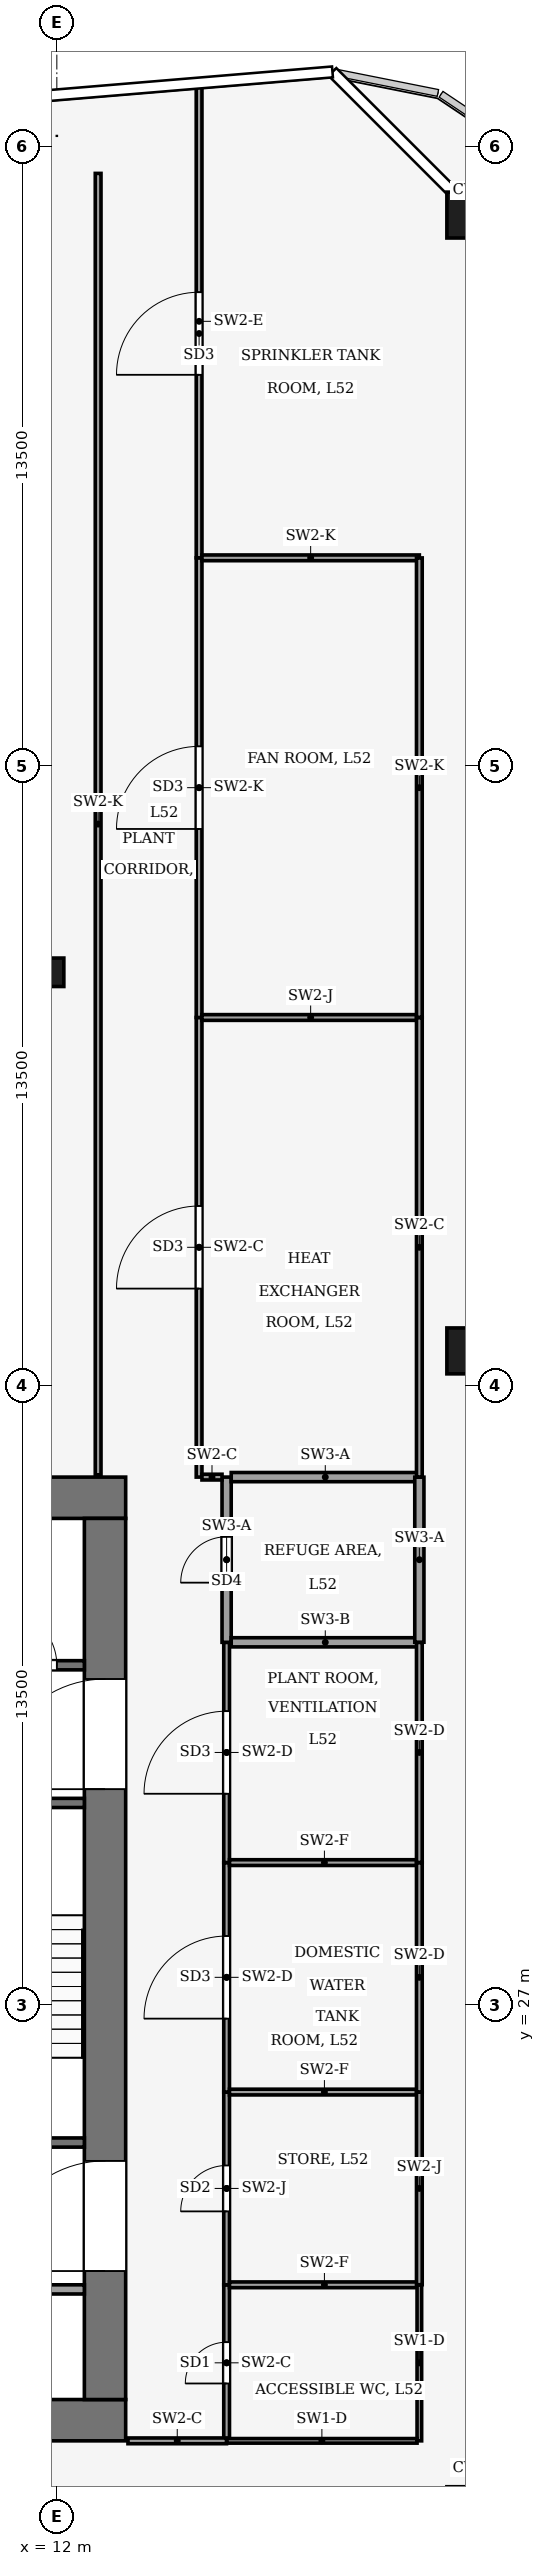
"""IFC4 building model, lengths in metres.
Left out: names, types, materials, properties, quantities, classifications, styles, units other than length and angle.
Written with IfcOpenShell. Run it as: python <this file> out.ifc"""

import sys

from ifc_helpers import new_model, si_unit, direction, frame, frame_2d, origin, origin_2d, place, context, subcontext, project, spatial, rectangle, hollow_rectangle, i_section, extrude, element, fill, save


model = new_model("IFC4")
c1 = context("Model", 3, precision=1e-05, world=origin(), true_north=direction((0.0, 1.0)))
c2 = subcontext(c1, "Body", "Model", "MODEL_VIEW")
j1 = project(units=[si_unit("LENGTHUNIT", "METRE"), si_unit("PLANEANGLEUNIT", "RADIAN")], contexts=[c1])
p1 = place(None, origin())
s1 = spatial("IfcSite", under=j1, at=p1, CompositionType="ELEMENT")
p2 = place(p1, origin())
s2 = spatial("IfcBuilding", under=s1, at=p2, CompositionType="ELEMENT")
p3 = place(p2, frame((0.0, 0.0, 226.0)))
s3 = spatial("IfcBuildingStorey", under=s2, at=p3, CompositionType="ELEMENT", Elevation=226.0)
for number, where, z_axis, x_axis in (
    (1, (-13.5, 17.95, -0.25), (0.0, 0.0, 1.0), (1.0, 0.0, 0.0)),
    (2, (-13.5, 38.05, -0.25), (0.0, 0.0, 1.0), (1.0, 0.0, 0.0)),
):
    element("IfcWall", number, at=place(p3, frame(where, z_axis=z_axis, x_axis=x_axis)), inside=s3, PredefinedType="SHEAR", context=c2, shape_type="SweptSolid", body=[
        extrude(rectangle(XDim=27.0, YDim=0.9, at=frame_2d((13.5, 0.0))), origin(), (0.0, 0.0, 1.0), 7.12),
    ])
p4 = place(p3, frame((13.05, 18.4, -0.25), z_axis=(0.0, 0.0, 1.0), x_axis=(0.0, 1.0, 0.0)))
e3 = element("IfcWall", 3, at=p4, inside=s3, PredefinedType="SHEAR", context=c2, shape_type="SweptSolid", body=[
    extrude(rectangle(XDim=19.2, YDim=0.9, at=frame_2d((9.6, 0.0))), origin(), (0.0, 0.0, 1.0), 7.12),
])
p5 = place(p4, frame((2.8, 0.0, 0.25)))
e4 = element("IfcOpeningElement", 4, at=p5, cuts=e3, PredefinedType="OPENING", context=c2, shape_type="SweptSolid", body=[
    extrude(rectangle(XDim=2.4, YDim=2.4, at=frame_2d((1.2, 1.2))), frame((0.0, 0.46, 0.0), z_axis=(0.0, -1.0, 0.0), x_axis=(1.0, 0.0, 0.0)), (0.0, 0.0, 1.0), 0.92),
])
p6 = place(p4, frame((13.3, 0.0, 0.25)))
e5 = element("IfcOpeningElement", 5, at=p6, cuts=e3, PredefinedType="OPENING", context=c2, shape_type="SweptSolid", body=[
    extrude(rectangle(XDim=2.4, YDim=2.4, at=frame_2d((1.2, 1.2))), frame((0.0, 0.46, 0.0), z_axis=(0.0, -1.0, 0.0), x_axis=(1.0, 0.0, 0.0)), (0.0, 0.0, 1.0), 0.92),
])
for number, where, z_axis, x_axis in (
    (6, (21.0, 66.0, 0.0), (0.0, 0.0, 1.0), (1.0, 0.0, 0.0)),
    (7, (21.0, 41.25, 0.0), (0.0, 0.0, 1.0), (1.0, 0.0, 0.0)),
):
    element("IfcColumn", number, at=place(p3, frame(where, z_axis=z_axis, x_axis=x_axis)), inside=s3, PredefinedType="COLUMN", context=c2, shape_type="SweptSolid", body=[
        extrude(hollow_rectangle(XDim=1.0, YDim=1.0, WallThickness=0.06, at=origin_2d()), origin(), (0.0, 0.0, 1.0), 7.0),
    ])
p7 = place(p3, frame((12.0, 67.7, 0.023), z_axis=(0.0, 0.007196331241, 0.999974106073), x_axis=(-1.0, 0.0, 0.0)))
e8 = element("IfcColumn", 8, at=p7, inside=s3, PredefinedType="COLUMN", context=c2, shape_type="SweptSolid", body=[
    extrude(hollow_rectangle(XDim=0.7, YDim=0.7, WallThickness=0.03, at=origin_2d()), origin(), (0.0, 0.0, 1.0), 6.955),
])
p8 = place(p3, frame((12.0, 49.5, 0.0), z_axis=(0.0, 0.0, 1.0), x_axis=(1.0, 0.0, 0.0)))
e9 = element("IfcColumn", 9, at=p8, inside=s3, PredefinedType="COLUMN", context=c2, shape_type="SweptSolid", body=[
    extrude(i_section(OverallWidth=0.305, OverallDepth=0.62, WebThickness=0.021, FlangeThickness=0.04, FilletRadius=0.027, at=origin_2d()), origin(), (0.0, 0.0, 1.0), 7.0),
])
p9 = place(p3, frame((6.0, 20.8, 0.0), z_axis=(0.0, 0.0, 1.0), x_axis=(1.0, 0.0, 0.0)))
e10 = element("IfcWall", 10, at=p9, inside=s3, PredefinedType="PARTITIONING", context=c2, shape_type="SweptSolid", body=[
    extrude(rectangle(XDim=6.6, YDim=0.2, at=frame_2d((3.3, 0.0))), origin(), (0.0, 0.0, 1.0), 6.87),
])
p10 = place(p9, frame((2.8, 0.0, 0.0)))
e11 = element("IfcOpeningElement", 11, at=p10, cuts=e10, PredefinedType="OPENING", context=c2, shape_type="SweptSolid", body=[
    extrude(rectangle(XDim=1.0, YDim=2.1, at=frame_2d((0.5, 1.05))), frame((0.0, 0.11, 0.0), z_axis=(0.0, -1.0, 0.0), x_axis=(1.0, 0.0, 0.0)), (0.0, 0.0, 1.0), 0.22),
])
p11 = place(p3, frame((6.0, 24.0, 0.0), z_axis=(0.0, 0.0, 1.0), x_axis=(1.0, 0.0, 0.0)))
e12 = element("IfcWall", 12, at=p11, inside=s3, PredefinedType="PARTITIONING", context=c2, shape_type="SweptSolid", body=[
    extrude(rectangle(XDim=6.6, YDim=0.2, at=frame_2d((3.3, 0.0))), origin(), (0.0, 0.0, 1.0), 6.87),
])
p12 = place(p11, frame((0.9, 0.0, 0.0)))
e13 = element("IfcOpeningElement", 13, at=p12, cuts=e12, PredefinedType="OPENING", context=c2, shape_type="SweptSolid", body=[
    extrude(rectangle(XDim=1.0, YDim=2.1, at=frame_2d((0.5, 1.05))), frame((0.0, 0.11, 0.0), z_axis=(0.0, -1.0, 0.0), x_axis=(1.0, 0.0, 0.0)), (0.0, 0.0, 1.0), 0.22),
])
p13 = place(p11, frame((4.4, 0.0, 0.0)))
e14 = element("IfcOpeningElement", 14, at=p13, cuts=e12, PredefinedType="OPENING", context=c2, shape_type="SweptSolid", body=[
    extrude(rectangle(XDim=1.2, YDim=2.2, at=frame_2d((0.6, 1.1))), frame((0.0, 0.11, 0.0), z_axis=(0.0, -1.0, 0.0), x_axis=(1.0, 0.0, 0.0)), (0.0, 0.0, 1.0), 0.22),
])
p14 = place(p3, frame((6.0, 31.4, 0.0), z_axis=(0.0, 0.0, 1.0), x_axis=(1.0, 0.0, 0.0)))
e15 = element("IfcWall", 15, at=p14, inside=s3, PredefinedType="PARTITIONING", context=c2, shape_type="SweptSolid", body=[
    extrude(rectangle(XDim=6.6, YDim=0.2, at=frame_2d((3.3, 0.0))), origin(), (0.0, 0.0, 1.0), 6.87),
])
p15 = place(p3, frame((6.0, 34.4, 0.0), z_axis=(0.0, 0.0, 1.0), x_axis=(1.0, 0.0, 0.0)))
e16 = element("IfcWall", 16, at=p15, inside=s3, PredefinedType="PARTITIONING", context=c2, shape_type="SweptSolid", body=[
    extrude(rectangle(XDim=6.6, YDim=0.2, at=frame_2d((3.3, 0.0))), origin(), (0.0, 0.0, 1.0), 6.87),
])
p16 = place(p15, frame((4.8, 0.0, 0.0)))
e17 = element("IfcOpeningElement", 17, at=p16, cuts=e16, PredefinedType="OPENING", context=c2, shape_type="SweptSolid", body=[
    extrude(rectangle(XDim=1.2, YDim=2.2, at=frame_2d((0.6, 1.1))), frame((0.0, 0.11, 0.0), z_axis=(0.0, -1.0, 0.0), x_axis=(1.0, 0.0, 0.0)), (0.0, 0.0, 1.0), 0.22),
])
p17 = place(p3, frame((15.7, 17.5, 0.0), z_axis=(0.0, 0.0, 1.0), x_axis=(0.0, 1.0, 0.0)))
e18 = element("IfcWall", 18, at=p17, inside=s3, PredefinedType="PARTITIONING", context=c2, shape_type="SweptSolid", body=[
    extrude(rectangle(XDim=3.4, YDim=0.125, at=frame_2d((1.7, 0.0))), origin(), (0.0, 0.0, 1.0), 6.14),
])
p18 = place(p17, frame((1.25, 0.0, 0.0)))
e19 = element("IfcOpeningElement", 19, at=p18, cuts=e18, PredefinedType="OPENING", context=c2, shape_type="SweptSolid", body=[
    extrude(rectangle(XDim=0.9, YDim=2.1, at=frame_2d((0.45, 1.05))), frame((0.0, 0.073, 0.0), z_axis=(0.0, -1.0, 0.0), x_axis=(1.0, 0.0, 0.0)), (0.0, 0.0, 1.0), 0.145),
])
p19 = place(p3, frame((15.7, 20.9, 0.0), z_axis=(0.0, 0.0, 1.0), x_axis=(0.0, 1.0, 0.0)))
e20 = element("IfcWall", 20, at=p19, inside=s3, PredefinedType="PARTITIONING", context=c2, shape_type="SweptSolid", body=[
    extrude(rectangle(XDim=4.2, YDim=0.125, at=frame_2d((2.1, 0.0))), origin(), (0.0, 0.0, 1.0), 6.39),
])
p20 = place(p19, frame((1.6, 0.0, 0.0)))
e21 = element("IfcOpeningElement", 21, at=p20, cuts=e20, PredefinedType="OPENING", context=c2, shape_type="SweptSolid", body=[
    extrude(rectangle(XDim=1.0, YDim=2.1, at=frame_2d((0.5, 1.05))), frame((0.0, 0.073, 0.0), z_axis=(0.0, -1.0, 0.0), x_axis=(1.0, 0.0, 0.0)), (0.0, 0.0, 1.0), 0.145),
])
p21 = place(p3, frame((15.7, 25.1, 0.0), z_axis=(0.0, 0.0, 1.0), x_axis=(0.0, 1.0, 0.0)))
e22 = element("IfcWall", 22, at=p21, inside=s3, PredefinedType="PARTITIONING", context=c2, shape_type="SweptSolid", body=[
    extrude(rectangle(XDim=5.0, YDim=0.125, at=frame_2d((2.5, 0.0))), origin(), (0.0, 0.0, 1.0), 6.44),
])
p22 = place(p21, frame((1.6, 0.0, 0.0)))
e23 = element("IfcOpeningElement", 23, at=p22, cuts=e22, PredefinedType="OPENING", context=c2, shape_type="SweptSolid", body=[
    extrude(rectangle(XDim=1.8, YDim=2.4, at=frame_2d((0.9, 1.2))), frame((0.0, 0.073, 0.0), z_axis=(0.0, -1.0, 0.0), x_axis=(1.0, 0.0, 0.0)), (0.0, 0.0, 1.0), 0.145),
])
p23 = place(p3, frame((15.7, 30.1, 0.0), z_axis=(0.0, 0.0, 1.0), x_axis=(0.0, 1.0, 0.0)))
e24 = element("IfcWall", 24, at=p23, inside=s3, PredefinedType="PARTITIONING", context=c2, shape_type="SweptSolid", body=[
    extrude(rectangle(XDim=4.8, YDim=0.125, at=frame_2d((2.4, 0.0))), origin(), (0.0, 0.0, 1.0), 6.44),
])
p24 = place(p23, frame((1.5, 0.0, 0.0)))
e25 = element("IfcOpeningElement", 25, at=p24, cuts=e24, PredefinedType="OPENING", context=c2, shape_type="SweptSolid", body=[
    extrude(rectangle(XDim=1.8, YDim=2.4, at=frame_2d((0.9, 1.2))), frame((0.0, 0.073, 0.0), z_axis=(0.0, -1.0, 0.0), x_axis=(1.0, 0.0, 0.0)), (0.0, 0.0, 1.0), 0.145),
])
p25 = place(p3, frame((15.7, 34.9, 0.0), z_axis=(0.0, 0.0, 1.0), x_axis=(0.0, 1.0, 0.0)))
e26 = element("IfcWall", 26, at=p25, inside=s3, PredefinedType="PARTITIONING", context=c2, shape_type="SweptSolid", body=[
    extrude(rectangle(XDim=3.6, YDim=0.2, at=frame_2d((1.8, 0.0))), origin(), (0.0, 0.0, 1.0), 6.14),
])
p26 = place(p25, frame((1.3, 0.0, 0.0)))
e27 = element("IfcOpeningElement", 27, at=p26, cuts=e26, PredefinedType="OPENING", context=c2, shape_type="SweptSolid", body=[
    extrude(rectangle(XDim=1.0, YDim=2.1, at=frame_2d((0.5, 1.05))), frame((0.0, 0.11, 0.0), z_axis=(0.0, -1.0, 0.0), x_axis=(1.0, 0.0, 0.0)), (0.0, 0.0, 1.0), 0.22),
])
p27 = place(p3, frame((15.1, 38.5, 0.0), z_axis=(0.0, 0.0, 1.0), x_axis=(0.0, 1.0, 0.0)))
e28 = element("IfcWall", 28, at=p27, inside=s3, PredefinedType="PARTITIONING", context=c2, shape_type="SweptSolid", body=[
    extrude(rectangle(XDim=10.015, YDim=0.125, at=frame_2d((5.007, 0.0))), origin(), (0.0, 0.0, 1.0), 6.14),
])
p28 = place(p27, frame((4.107, 0.0, 0.0)))
e29 = element("IfcOpeningElement", 29, at=p28, cuts=e28, PredefinedType="OPENING", context=c2, shape_type="SweptSolid", body=[
    extrude(rectangle(XDim=1.8, YDim=2.4, at=frame_2d((0.9, 1.2))), frame((0.0, 0.073, 0.0), z_axis=(0.0, -1.0, 0.0), x_axis=(1.0, 0.0, 0.0)), (0.0, 0.0, 1.0), 0.145),
])
p29 = place(p3, frame((15.163, 38.5, 0.0), z_axis=(0.0, 0.0, 1.0), x_axis=(1.0, 0.0, 0.0)))
e30 = element("IfcWall", 30, at=p29, inside=s3, PredefinedType="PARTITIONING", context=c2, shape_type="SweptSolid", body=[
    extrude(rectangle(XDim=0.438, YDim=0.125, at=frame_2d((0.219, 0.0))), origin(), (0.0, 0.0, 1.0), 6.14),
])
p30 = place(p3, frame((15.1, 48.515, 0.0), z_axis=(0.0, 0.0, 1.0), x_axis=(0.0, 1.0, 0.0)))
e31 = element("IfcWall", 31, at=p30, inside=s3, PredefinedType="PARTITIONING", context=c2, shape_type="SweptSolid", body=[
    extrude(rectangle(XDim=10.016, YDim=0.125, at=frame_2d((5.008, 0.0))), origin(), (0.0, 0.0, 1.0), 6.24),
])
p31 = place(p30, frame((4.108, 0.0, 0.0)))
e32 = element("IfcOpeningElement", 32, at=p31, cuts=e31, PredefinedType="OPENING", context=c2, shape_type="SweptSolid", body=[
    extrude(rectangle(XDim=1.8, YDim=2.4, at=frame_2d((0.9, 1.2))), frame((0.0, 0.073, 0.0), z_axis=(0.0, -1.0, 0.0), x_axis=(1.0, 0.0, 0.0)), (0.0, 0.0, 1.0), 0.145),
])
p32 = place(p3, frame((15.1, 58.531, 0.0), z_axis=(0.0, 0.0, 1.0), x_axis=(0.0, 1.0, 0.0)))
e33 = element("IfcWall", 33, at=p32, inside=s3, PredefinedType="PARTITIONING", context=c2, shape_type="SweptSolid", body=[
    extrude(rectangle(XDim=10.307, YDim=0.125, at=frame_2d((5.154, 0.0))), origin(), (0.0, 0.0, 1.0), 6.04),
])
p33 = place(p32, frame((3.988, 0.0, 0.0)))
e34 = element("IfcOpeningElement", 34, at=p33, cuts=e33, PredefinedType="OPENING", context=c2, shape_type="SweptSolid", body=[
    extrude(rectangle(XDim=1.8, YDim=2.4, at=frame_2d((0.9, 1.2))), frame((0.0, 0.073, 0.0), z_axis=(0.0, -1.0, 0.0), x_axis=(1.0, 0.0, 0.0)), (0.0, 0.0, 1.0), 0.145),
])
for number, where, z_axis, x_axis in (
    (35, (15.762, 20.9, 0.0), (0.0, 0.0, 1.0), (1.0, 0.0, 0.0)),
    (36, (15.762, 25.1, 0.0), (0.0, 0.0, 1.0), (1.0, 0.0, 0.0)),
    (37, (15.762, 30.1, 0.0), (0.0, 0.0, 1.0), (1.0, 0.0, 0.0)),
):
    element("IfcWall", number, at=place(p3, frame(where, z_axis=z_axis, x_axis=x_axis)), inside=s3, PredefinedType="PARTITIONING", context=c2, shape_type="SweptSolid", body=[
        extrude(rectangle(XDim=4.137, YDim=0.125, at=frame_2d((2.069, 0.0))), origin(), (0.0, 0.0, 1.0), 6.87),
    ])
p34 = place(p3, frame((15.8, 34.9, 0.0), z_axis=(0.0, 0.0, 1.0), x_axis=(1.0, 0.0, 0.0)))
e38 = element("IfcWall", 38, at=p34, inside=s3, PredefinedType="PARTITIONING", context=c2, shape_type="SweptSolid", body=[
    extrude(rectangle(XDim=4.1, YDim=0.2, at=frame_2d((2.05, 0.0))), origin(), (0.0, 0.0, 1.0), 6.87),
])
p35 = place(p3, frame((15.8, 38.5, 0.0), z_axis=(0.0, 0.0, 1.0), x_axis=(1.0, 0.0, 0.0)))
e39 = element("IfcWall", 39, at=p35, inside=s3, PredefinedType="PARTITIONING", context=c2, shape_type="SweptSolid", body=[
    extrude(rectangle(XDim=4.1, YDim=0.2, at=frame_2d((2.05, 0.0))), origin(), (0.0, 0.0, 1.0), 6.14),
])
p36 = place(p3, frame((15.163, 48.515, 0.0), z_axis=(0.0, 0.0, 1.0), x_axis=(1.0, 0.0, 0.0)))
e40 = element("IfcWall", 40, at=p36, inside=s3, PredefinedType="PARTITIONING", context=c2, shape_type="SweptSolid", body=[
    extrude(rectangle(XDim=4.737, YDim=0.125, at=frame_2d((2.369, 0.0))), origin(), (0.0, 0.0, 1.0), 6.39),
])
p37 = place(p3, frame((15.163, 58.531, 0.0), z_axis=(0.0, 0.0, 1.0), x_axis=(1.0, 0.0, 0.0)))
e41 = element("IfcWall", 41, at=p37, inside=s3, PredefinedType="PARTITIONING", context=c2, shape_type="SweptSolid", body=[
    extrude(rectangle(XDim=4.737, YDim=0.125, at=frame_2d((2.369, 0.0))), origin(), (0.0, 0.0, 1.0), 6.24),
])
p38 = place(p3, frame((12.9, 38.55, 0.0), z_axis=(0.0, 0.0, 1.0), x_axis=(0.0, 1.0, 0.0)))
e42 = element("IfcWall", 42, at=p38, inside=s3, PredefinedType="PARTITIONING", context=c2, shape_type="SweptSolid", body=[
    extrude(rectangle(XDim=28.358, YDim=0.125, at=frame_2d((14.179, 0.0))), origin(), (0.0, 0.0, 1.0), 6.24),
])
p39 = place(p3, frame((15.698, 17.5, 0.0), z_axis=(0.0, 0.0, 1.0), x_axis=(-1.0, 0.0, 0.0)))
e43 = element("IfcWall", 43, at=p39, inside=s3, PredefinedType="PARTITIONING", context=c2, shape_type="SweptSolid", body=[
    extrude(rectangle(XDim=2.148, YDim=0.125, at=frame_2d((1.074, 0.0))), origin(), (0.0, 0.0, 1.0), 6.14),
])
p40 = place(p3, frame((19.9, 20.898, 0.0), z_axis=(0.0, 0.0, 1.0), x_axis=(0.0, -1.0, 0.0)))
e44 = element("IfcWall", 44, at=p40, inside=s3, PredefinedType="PARTITIONING", context=c2, shape_type="SweptSolid", body=[
    extrude(rectangle(XDim=3.398, YDim=0.1, at=frame_2d((1.699, 0.0))), origin(), (0.0, 0.0, 1.0), 6.14),
])
p41 = place(p3, frame((19.85, 17.5, 0.0), z_axis=(0.0, 0.0, 1.0), x_axis=(-1.0, 0.0, 0.0)))
e45 = element("IfcWall", 45, at=p41, inside=s3, PredefinedType="PARTITIONING", context=c2, shape_type="SweptSolid", body=[
    extrude(rectangle(XDim=4.148, YDim=0.1, at=frame_2d((2.074, 0.0))), origin(), (0.0, 0.0, 1.0), 6.14),
])
p42 = place(p3, frame((19.9, 25.098, 0.0), z_axis=(0.0, 0.0, 1.0), x_axis=(0.0, -1.0, 0.0)))
e46 = element("IfcWall", 46, at=p42, inside=s3, PredefinedType="PARTITIONING", context=c2, shape_type="SweptSolid", body=[
    extrude(rectangle(XDim=4.196, YDim=0.125, at=frame_2d((2.098, 0.0))), origin(), (0.0, 0.0, 1.0), 6.39),
])
p43 = place(p3, frame((19.9, 30.098, 0.0), z_axis=(0.0, 0.0, 1.0), x_axis=(0.0, -1.0, 0.0)))
e47 = element("IfcWall", 47, at=p43, inside=s3, PredefinedType="PARTITIONING", context=c2, shape_type="SweptSolid", body=[
    extrude(rectangle(XDim=4.996, YDim=0.125, at=frame_2d((2.498, 0.0))), origin(), (0.0, 0.0, 1.0), 6.44),
])
p44 = place(p3, frame((19.9, 34.898, 0.0), z_axis=(0.0, 0.0, 1.0), x_axis=(0.0, -1.0, 0.0)))
e48 = element("IfcWall", 48, at=p44, inside=s3, PredefinedType="PARTITIONING", context=c2, shape_type="SweptSolid", body=[
    extrude(rectangle(XDim=4.796, YDim=0.125, at=frame_2d((2.398, 0.0))), origin(), (0.0, 0.0, 1.0), 6.44),
])
p45 = place(p3, frame((19.9, 38.498, 0.0), z_axis=(0.0, 0.0, 1.0), x_axis=(0.0, -1.0, 0.0)))
e49 = element("IfcWall", 49, at=p45, inside=s3, PredefinedType="PARTITIONING", context=c2, shape_type="SweptSolid", body=[
    extrude(rectangle(XDim=3.596, YDim=0.2, at=frame_2d((1.798, 0.0))), origin(), (0.0, 0.0, 1.0), 6.14),
])
p46 = place(p3, frame((19.9, 48.513, 0.0), z_axis=(0.0, 0.0, 1.0), x_axis=(0.0, -1.0, 0.0)))
e50 = element("IfcWall", 50, at=p46, inside=s3, PredefinedType="PARTITIONING", context=c2, shape_type="SweptSolid", body=[
    extrude(rectangle(XDim=10.011, YDim=0.125, at=frame_2d((5.005, 0.0))), origin(), (0.0, 0.0, 1.0), 6.14),
])
p47 = place(p3, frame((19.9, 58.529, 0.0), z_axis=(0.0, 0.0, 1.0), x_axis=(0.0, -1.0, 0.0)))
e51 = element("IfcWall", 51, at=p47, inside=s3, PredefinedType="PARTITIONING", context=c2, shape_type="SweptSolid", body=[
    extrude(rectangle(XDim=10.012, YDim=0.125, at=frame_2d((5.006, 0.0))), origin(), (0.0, 0.0, 1.0), 6.24),
])
p48 = place(p16, origin())
e52 = element("IfcDoor", 52, at=p48, inside=s3, OperationType="SINGLE_SWING_LEFT", PredefinedType="DOOR", context=c2, shape_type="SweptSolid", body=[
    extrude(rectangle(XDim=1.2, YDim=2.2, at=frame_2d((0.6, 1.1))), frame((0.0, 0.025, 0.0), z_axis=(0.0, -1.0, 0.0), x_axis=(1.0, 0.0, 0.0)), (0.0, 0.0, 1.0), 0.05),
])
fill(e17, e52)
p49 = place(p5, origin())
e53 = element("IfcDoor", 53, at=p49, inside=s3, OperationType="DOUBLE_DOOR_SINGLE_SWING", PredefinedType="DOOR", context=c2, shape_type="SweptSolid", body=[
    extrude(rectangle(XDim=2.4, YDim=2.4, at=frame_2d((1.2, 1.2))), frame((0.0, 0.025, 0.0), z_axis=(0.0, -1.0, 0.0), x_axis=(1.0, 0.0, 0.0)), (0.0, 0.0, 1.0), 0.05),
])
fill(e4, e53)
p50 = place(p6, origin())
e54 = element("IfcDoor", 54, at=p50, inside=s3, OperationType="DOUBLE_DOOR_SINGLE_SWING", PredefinedType="DOOR", context=c2, shape_type="SweptSolid", body=[
    extrude(rectangle(XDim=2.4, YDim=2.4, at=frame_2d((1.2, 1.2))), frame((0.0, 0.025, 0.0), z_axis=(0.0, -1.0, 0.0), x_axis=(1.0, 0.0, 0.0)), (0.0, 0.0, 1.0), 0.05),
])
fill(e5, e54)
p51 = place(p18, origin())
e55 = element("IfcDoor", 55, at=p51, inside=s3, OperationType="SINGLE_SWING_LEFT", PredefinedType="DOOR", context=c2, shape_type="SweptSolid", body=[
    extrude(rectangle(XDim=0.9, YDim=2.1, at=frame_2d((0.45, 1.05))), frame((0.0, 0.025, 0.0), z_axis=(0.0, -1.0, 0.0), x_axis=(1.0, 0.0, 0.0)), (0.0, 0.0, 1.0), 0.05),
])
fill(e19, e55)
p52 = place(p20, origin())
e56 = element("IfcDoor", 56, at=p52, inside=s3, OperationType="SINGLE_SWING_RIGHT", PredefinedType="DOOR", context=c2, shape_type="SweptSolid", body=[
    extrude(rectangle(XDim=1.0, YDim=2.1, at=frame_2d((0.5, 1.05))), frame((0.0, 0.025, 0.0), z_axis=(0.0, -1.0, 0.0), x_axis=(1.0, 0.0, 0.0)), (0.0, 0.0, 1.0), 0.05),
])
fill(e21, e56)
p53 = place(p22, origin())
e57 = element("IfcDoor", 57, at=p53, inside=s3, OperationType="DOUBLE_DOOR_SINGLE_SWING", PredefinedType="DOOR", context=c2, shape_type="SweptSolid", body=[
    extrude(rectangle(XDim=1.8, YDim=2.4, at=frame_2d((0.9, 1.2))), frame((0.0, 0.025, 0.0), z_axis=(0.0, -1.0, 0.0), x_axis=(1.0, 0.0, 0.0)), (0.0, 0.0, 1.0), 0.05),
])
fill(e23, e57)
p54 = place(p24, origin())
e58 = element("IfcDoor", 58, at=p54, inside=s3, OperationType="DOUBLE_DOOR_SINGLE_SWING", PredefinedType="DOOR", context=c2, shape_type="SweptSolid", body=[
    extrude(rectangle(XDim=1.8, YDim=2.4, at=frame_2d((0.9, 1.2))), frame((0.0, 0.025, 0.0), z_axis=(0.0, -1.0, 0.0), x_axis=(1.0, 0.0, 0.0)), (0.0, 0.0, 1.0), 0.05),
])
fill(e25, e58)
p55 = place(p26, origin())
e59 = element("IfcDoor", 59, at=p55, inside=s3, OperationType="SINGLE_SWING_LEFT", PredefinedType="DOOR", context=c2, shape_type="SweptSolid", body=[
    extrude(rectangle(XDim=1.0, YDim=2.1, at=frame_2d((0.5, 1.05))), frame((0.0, 0.025, 0.0), z_axis=(0.0, -1.0, 0.0), x_axis=(1.0, 0.0, 0.0)), (0.0, 0.0, 1.0), 0.05),
])
fill(e27, e59)
p56 = place(p28, origin())
e60 = element("IfcDoor", 60, at=p56, inside=s3, OperationType="DOUBLE_DOOR_SINGLE_SWING", PredefinedType="DOOR", context=c2, shape_type="SweptSolid", body=[
    extrude(rectangle(XDim=1.8, YDim=2.4, at=frame_2d((0.9, 1.2))), frame((0.0, 0.025, 0.0), z_axis=(0.0, -1.0, 0.0), x_axis=(1.0, 0.0, 0.0)), (0.0, 0.0, 1.0), 0.05),
])
fill(e29, e60)
p57 = place(p31, origin())
e61 = element("IfcDoor", 61, at=p57, inside=s3, OperationType="DOUBLE_DOOR_SINGLE_SWING", PredefinedType="DOOR", context=c2, shape_type="SweptSolid", body=[
    extrude(rectangle(XDim=1.8, YDim=2.4, at=frame_2d((0.9, 1.2))), frame((0.0, 0.025, 0.0), z_axis=(0.0, -1.0, 0.0), x_axis=(1.0, 0.0, 0.0)), (0.0, 0.0, 1.0), 0.05),
])
fill(e32, e61)
p58 = place(p33, origin())
e62 = element("IfcDoor", 62, at=p58, inside=s3, OperationType="DOUBLE_DOOR_SINGLE_SWING", PredefinedType="DOOR", context=c2, shape_type="SweptSolid", body=[
    extrude(rectangle(XDim=1.8, YDim=2.4, at=frame_2d((0.9, 1.2))), frame((0.0, 0.025, 0.0), z_axis=(0.0, -1.0, 0.0), x_axis=(1.0, 0.0, 0.0)), (0.0, 0.0, 1.0), 0.05),
])
fill(e34, e62)
save(model, sys.argv[1])
